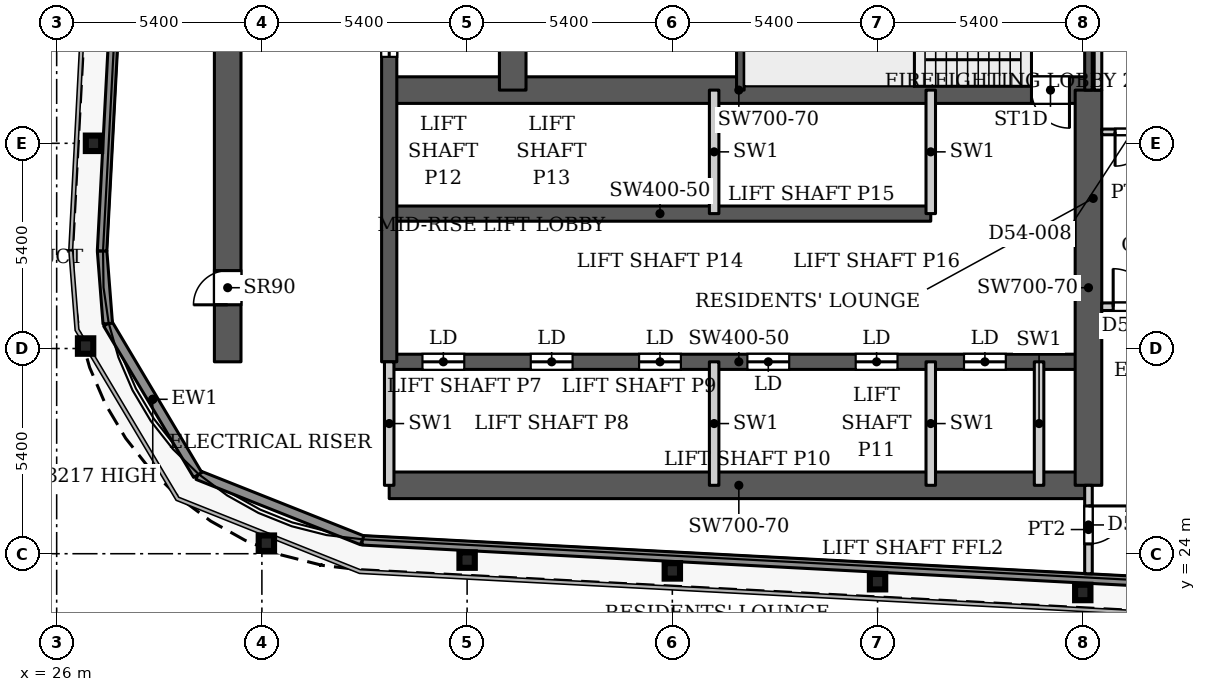
"""IFC4 building model, lengths in metres.
Left out: names, types, materials, properties, quantities, classifications, styles, units other than length and angle.
Written with IfcOpenShell. Run it as: python <this file> out.ifc"""

import sys

from ifc_helpers import new_model, si_unit, direction, frame, frame_2d, origin, origin_2d, place, context, subcontext, project, spatial, rectangle, i_section, extrude, source, transform, mapped, element, fill, save


model = new_model("IFC4")
c1 = context("Model", 3, precision=1e-05, world=origin(), true_north=direction((0.0, 1.0)))
c2 = subcontext(c1, "Body", "Model", "MODEL_VIEW")
j1 = project(units=[si_unit("LENGTHUNIT", "METRE"), si_unit("PLANEANGLEUNIT", "RADIAN")], contexts=[c1])
p1 = place(None, origin())
s1 = spatial("IfcSite", under=j1, at=p1, CompositionType="ELEMENT")
p2 = place(p1, origin())
s2 = spatial("IfcBuilding", under=s1, at=p2, CompositionType="ELEMENT")
p3 = place(p2, frame((0.0, 0.0, 235.7)))
s3 = spatial("IfcBuildingStorey", under=s2, at=p3, CompositionType="ELEMENT", Elevation=235.7)
for number, where, z_axis, x_axis in (
    (1, (53.0, 22.98, 0.0), (0.0, 0.0, 1.0), (1.0, 0.0, 0.0)),
    (2, (47.6, 23.264, 0.0), (0.0, 0.0, 1.0), (1.0, 0.0, 0.0)),
    (3, (42.2, 23.548, 0.0), (0.0, 0.0, 1.0), (1.0, 0.0, 0.0)),
    (4, (36.8, 23.832, 0.0), (0.0, 0.0, 1.0), (1.0, 0.0, 0.0)),
    (5, (31.518, 24.277, 0.0), (0.0, 0.0, 1.0), (1.0, 0.0, 0.0)),
    (6, (26.761, 29.465, 0.0), (0.0, 0.0, 1.0), (1.0, 0.0, 0.0)),
    (7, (26.969, 34.8, 0.0), (0.0, 0.0, 1.0), (1.0, 0.0, 0.0)),
):
    element("IfcColumn", number, at=place(p3, frame(where, z_axis=z_axis, x_axis=x_axis)), inside=s3, PredefinedType="COLUMN", context=c2, shape_type="SweptSolid", body=[
        extrude(i_section(OverallWidth=0.404, OverallDepth=0.407, WebThickness=0.027, FlangeThickness=0.044, FilletRadius=0.012, at=origin_2d()), origin(), (0.0, 0.0, 1.0), 3.9),
    ])
p4 = place(p3, frame((34.75, 25.8, 0.0), z_axis=(0.0, 0.0, 1.0), x_axis=(1.0, 0.0, 0.0)))
e8 = element("IfcWall", 8, at=p4, inside=s3, PredefinedType="SHEAR", context=c2, shape_type="SweptSolid", body=[
    extrude(rectangle(XDim=18.4, YDim=0.7, at=frame_2d((9.2, 0.0))), origin(), (0.0, 0.0, 1.0), 3.9),
])
p5 = place(p3, frame((34.75, 29.05, 0.0), z_axis=(0.0, 0.0, 1.0), x_axis=(1.0, 0.0, 0.0)))
e9 = element("IfcWall", 9, at=p5, inside=s3, PredefinedType="SHEAR", context=c2, shape_type="SweptSolid", body=[
    extrude(rectangle(XDim=18.4, YDim=0.4, at=frame_2d((9.2, 0.0))), origin(), (0.0, 0.0, 1.0), 3.9),
])
p6 = place(p5, frame((0.875, 0.0, 0.0)))
e10 = element("IfcOpeningElement", 10, at=p6, cuts=e9, PredefinedType="OPENING", context=c2, shape_type="SweptSolid", body=[
    extrude(rectangle(XDim=1.1, YDim=2.2, at=frame_2d((0.55, 1.1))), frame((0.0, 0.21, 0.0), z_axis=(0.0, -1.0, 0.0), x_axis=(1.0, 0.0, 0.0)), (0.0, 0.0, 1.0), 0.42),
])
p7 = place(p5, frame((3.725, 0.0, 0.0)))
e11 = element("IfcOpeningElement", 11, at=p7, cuts=e9, PredefinedType="OPENING", context=c2, shape_type="SweptSolid", body=[
    extrude(rectangle(XDim=1.1, YDim=2.2, at=frame_2d((0.55, 1.1))), frame((0.0, 0.21, 0.0), z_axis=(0.0, -1.0, 0.0), x_axis=(1.0, 0.0, 0.0)), (0.0, 0.0, 1.0), 0.42),
])
p8 = place(p5, frame((6.575, 0.0, 0.0)))
e12 = element("IfcOpeningElement", 12, at=p8, cuts=e9, PredefinedType="OPENING", context=c2, shape_type="SweptSolid", body=[
    extrude(rectangle(XDim=1.1, YDim=2.2, at=frame_2d((0.55, 1.1))), frame((0.0, 0.21, 0.0), z_axis=(0.0, -1.0, 0.0), x_axis=(1.0, 0.0, 0.0)), (0.0, 0.0, 1.0), 0.42),
])
p9 = place(p5, frame((9.425, 0.0, 0.0)))
e13 = element("IfcOpeningElement", 13, at=p9, cuts=e9, PredefinedType="OPENING", context=c2, shape_type="SweptSolid", body=[
    extrude(rectangle(XDim=1.1, YDim=2.2, at=frame_2d((0.55, 1.1))), frame((0.0, 0.21, 0.0), z_axis=(0.0, -1.0, 0.0), x_axis=(1.0, 0.0, 0.0)), (0.0, 0.0, 1.0), 0.42),
])
p10 = place(p5, frame((12.275, 0.0, 0.0)))
e14 = element("IfcOpeningElement", 14, at=p10, cuts=e9, PredefinedType="OPENING", context=c2, shape_type="SweptSolid", body=[
    extrude(rectangle(XDim=1.1, YDim=2.2, at=frame_2d((0.55, 1.1))), frame((0.0, 0.21, 0.0), z_axis=(0.0, -1.0, 0.0), x_axis=(1.0, 0.0, 0.0)), (0.0, 0.0, 1.0), 0.42),
])
p11 = place(p5, frame((15.125, 0.0, 0.0)))
e15 = element("IfcOpeningElement", 15, at=p11, cuts=e9, PredefinedType="OPENING", context=c2, shape_type="SweptSolid", body=[
    extrude(rectangle(XDim=1.1, YDim=2.2, at=frame_2d((0.55, 1.1))), frame((0.0, 0.21, 0.0), z_axis=(0.0, -1.0, 0.0), x_axis=(1.0, 0.0, 0.0)), (0.0, 0.0, 1.0), 0.42),
])
p12 = place(p3, frame((34.75, 32.95, 0.0), z_axis=(0.0, 0.0, 1.0), x_axis=(1.0, 0.0, 0.0)))
e16 = element("IfcWall", 16, at=p12, inside=s3, PredefinedType="SHEAR", context=c2, shape_type="SweptSolid", body=[
    extrude(rectangle(XDim=14.25, YDim=0.4, at=frame_2d((7.125, 0.0))), origin(), (0.0, 0.0, 1.0), 3.9),
])
p13 = place(p3, frame((34.75, 36.2, 0.0), z_axis=(0.0, 0.0, 1.0), x_axis=(1.0, 0.0, 0.0)))
e17 = element("IfcWall", 17, at=p13, inside=s3, PredefinedType="SHEAR", context=c2, shape_type="SweptSolid", body=[
    extrude(rectangle(XDim=18.4, YDim=0.7, at=frame_2d((9.2, 0.0))), origin(), (0.0, 0.0, 1.0), 3.9),
])
p14 = place(p13, frame((16.9, 0.0, 0.0)))
e18 = element("IfcOpeningElement", 18, at=p14, cuts=e17, PredefinedType="OPENING", context=c2, shape_type="SweptSolid", body=[
    extrude(rectangle(XDim=1.0, YDim=2.2, at=frame_2d((0.5, 1.1))), frame((0.0, 0.36, 0.0), z_axis=(0.0, -1.0, 0.0), x_axis=(1.0, 0.0, 0.0)), (0.0, 0.0, 1.0), 0.72),
])
p15 = place(p3, frame((34.75, 29.05, 0.0), z_axis=(0.0, 0.0, 1.0), x_axis=(0.0, 1.0, 0.0)))
e19 = element("IfcWall", 19, at=p15, inside=s3, PredefinedType="SHEAR", context=c2, shape_type="SweptSolid", body=[
    extrude(rectangle(XDim=18.45, YDim=0.4, at=frame_2d((9.225, 0.0))), origin(), (0.0, 0.0, 1.0), 3.9),
])
p16 = place(p15, frame((8.025, 0.0, 0.0)))
e20 = element("IfcOpeningElement", 20, at=p16, cuts=e19, PredefinedType="OPENING", context=c2, shape_type="SweptSolid", body=[
    extrude(rectangle(XDim=1.1, YDim=2.2, at=frame_2d((0.55, 1.1))), frame((0.0, 0.21, 0.0), z_axis=(0.0, -1.0, 0.0), x_axis=(1.0, 0.0, 0.0)), (0.0, 0.0, 1.0), 0.42),
])
p17 = place(p15, frame((10.875, 0.0, 0.0)))
e21 = element("IfcOpeningElement", 21, at=p17, cuts=e19, PredefinedType="OPENING", context=c2, shape_type="SweptSolid", body=[
    extrude(rectangle(XDim=1.1, YDim=2.2, at=frame_2d((0.55, 1.1))), frame((0.0, 0.21, 0.0), z_axis=(0.0, -1.0, 0.0), x_axis=(1.0, 0.0, 0.0)), (0.0, 0.0, 1.0), 0.42),
])
p18 = place(p15, frame((13.725, 0.0, 0.0)))
e22 = element("IfcOpeningElement", 22, at=p18, cuts=e19, PredefinedType="OPENING", context=c2, shape_type="SweptSolid", body=[
    extrude(rectangle(XDim=1.1, YDim=2.2, at=frame_2d((0.55, 1.1))), frame((0.0, 0.21, 0.0), z_axis=(0.0, -1.0, 0.0), x_axis=(1.0, 0.0, 0.0)), (0.0, 0.0, 1.0), 0.42),
])
p19 = place(p15, frame((15.95, 0.0, 0.0)))
e23 = element("IfcOpeningElement", 23, at=p19, cuts=e19, PredefinedType="OPENING", context=c2, shape_type="SweptSolid", body=[
    extrude(rectangle(XDim=1.1, YDim=2.2, at=frame_2d((0.55, 1.1))), frame((0.0, 0.21, 0.0), z_axis=(0.0, -1.0, 0.0), x_axis=(1.0, 0.0, 0.0)), (0.0, 0.0, 1.0), 0.42),
])
p20 = place(p3, frame((38.0, 36.2, 0.0), z_axis=(0.0, 0.0, 1.0), x_axis=(0.0, 1.0, 0.0)))
e24 = element("IfcWall", 24, at=p20, inside=s3, PredefinedType="SHEAR", context=c2, shape_type="SweptSolid", body=[
    extrude(rectangle(XDim=8.55, YDim=0.7, at=frame_2d((4.275, 0.0))), origin(), (0.0, 0.0, 1.0), 3.9),
])
p21 = place(p3, frame((30.5, 29.05, 0.0), z_axis=(0.0, 0.0, 1.0), x_axis=(0.0, 1.0, 0.0)))
e25 = element("IfcWall", 25, at=p21, inside=s3, PredefinedType="SHEAR", context=c2, shape_type="SweptSolid", body=[
    extrude(rectangle(XDim=18.45, YDim=0.7, at=frame_2d((9.225, 0.0))), origin(), (0.0, 0.0, 1.0), 3.9),
])
p22 = place(p21, frame((1.5, 0.0, 0.0)))
e26 = element("IfcOpeningElement", 26, at=p22, cuts=e25, PredefinedType="OPENING", context=c2, shape_type="SweptSolid", body=[
    extrude(rectangle(XDim=0.9, YDim=2.2, at=frame_2d((0.45, 1.1))), frame((0.0, 0.36, 0.0), z_axis=(0.0, -1.0, 0.0), x_axis=(1.0, 0.0, 0.0)), (0.0, 0.0, 1.0), 0.72),
])
p23 = place(p21, frame((8.705, 0.0, 0.0)))
e27 = element("IfcOpeningElement", 27, at=p23, cuts=e25, PredefinedType="OPENING", context=c2, shape_type="SweptSolid", body=[
    extrude(rectangle(XDim=0.9, YDim=2.2, at=frame_2d((0.45, 1.1))), frame((0.0, 0.36, 0.0), z_axis=(0.0, -1.0, 0.0), x_axis=(1.0, 0.0, 0.0)), (0.0, 0.0, 1.0), 0.72),
])
p24 = place(p3, frame((53.15, 25.8, 0.0), z_axis=(0.0, 0.0, 1.0), x_axis=(0.0, 1.0, 0.0)))
e28 = element("IfcWall", 28, at=p24, inside=s3, PredefinedType="SHEAR", context=c2, shape_type="SweptSolid", body=[
    extrude(rectangle(XDim=10.4, YDim=0.7, at=frame_2d((5.2, 0.0))), origin(), (0.0, 0.0, 1.0), 3.9),
])
p25 = place(p3, frame((84.386, 21.703, 0.0), z_axis=(0.0, 0.0, 1.0), x_axis=(-0.998617508267, 0.05256493302, 0.0)))
e29 = element("IfcWall", 29, at=p25, inside=s3, PredefinedType="SOLIDWALL", context=c2, shape_type="SweptSolid", body=[
    extrude(rectangle(XDim=50.417, YDim=0.25, at=frame_2d((25.208, 0.0))), origin(), (0.0, 0.0, 1.0), 3.75),
])
p26 = place(p3, frame((34.039, 24.353, 0.0), z_axis=(0.0, 0.0, 1.0), x_axis=(-0.929352825399, 0.369192803184, 0.0)))
e30 = element("IfcWall", 30, at=p26, inside=s3, PredefinedType="SOLIDWALL", context=c2, shape_type="SweptSolid", body=[
    extrude(rectangle(XDim=4.656, YDim=0.25, at=frame_2d((2.328, 0.0))), origin(), (0.0, 0.0, 1.0), 3.75),
])
p27 = place(p3, frame((29.712, 26.072, 0.0), z_axis=(0.0, 0.0, 1.0), x_axis=(-0.511028049012, 0.859564036662, 0.0)))
e31 = element("IfcWall", 31, at=p27, inside=s3, PredefinedType="SOLIDWALL", context=c2, shape_type="SweptSolid", body=[
    extrude(rectangle(XDim=4.634, YDim=0.25, at=frame_2d((2.317, 0.0))), origin(), (0.0, 0.0, 1.0), 3.217),
])
p28 = place(p3, frame((27.344, 30.055, 0.0), z_axis=(0.0, 0.0, 1.0), x_axis=(-0.077571675317, 0.99698677784, 0.0)))
e32 = element("IfcWall", 32, at=p28, inside=s3, PredefinedType="SOLIDWALL", context=c2, shape_type="SweptSolid", body=[
    extrude(rectangle(XDim=1.92, YDim=0.25, at=frame_2d((0.96, 0.0))), origin(), (0.0, 0.0, 1.0), 3.75),
])
p29 = place(p3, frame((27.195, 31.969, 0.0), z_axis=(0.0, 0.0, 1.0), x_axis=(0.052555284099, 0.998618016117, 0.0)))
e33 = element("IfcWall", 33, at=p29, inside=s3, PredefinedType="SOLIDWALL", context=c2, shape_type="SweptSolid", body=[
    extrude(rectangle(XDim=61.38, YDim=0.25, at=frame_2d((30.69, 0.0))), origin(), (0.0, 0.0, 1.0), 3.75),
])
for number, where, z_axis, x_axis in (
    (34, (43.99, 36.2, 0.0), (0.0, 0.0, 1.0), (0.0, 1.0, 0.0)),
    (35, (53.15, 36.2, 0.0), (0.0, 0.0, 1.0), (0.0, 1.0, 0.0)),
):
    element("IfcWall", number, at=place(p3, frame(where, z_axis=z_axis, x_axis=x_axis)), inside=s3, PredefinedType="SHEAR", context=c2, shape_type="SweptSolid", body=[
        extrude(rectangle(XDim=3.15, YDim=0.2, at=frame_2d((1.575, 0.0))), origin(), (0.0, 0.0, 1.0), 3.9),
    ])
for number, where, z_axis, x_axis in (
    (36, (34.75, 25.8, 0.0), (0.0, 0.0, 1.0), (0.0, 1.0, 0.0)),
    (37, (43.3, 25.8, 0.0), (0.0, 0.0, 1.0), (0.0, 1.0, 0.0)),
    (38, (43.3, 32.95, 0.0), (0.0, 0.0, 1.0), (0.0, 1.0, 0.0)),
    (39, (49.0, 25.8, 0.0), (0.0, 0.0, 1.0), (0.0, 1.0, 0.0)),
    (40, (49.0, 32.95, 0.0), (0.0, 0.0, 1.0), (0.0, 1.0, 0.0)),
    (41, (51.85, 25.8, 0.0), (0.0, 0.0, 1.0), (0.0, 1.0, 0.0)),
):
    element("IfcWall", number, at=place(p3, frame(where, z_axis=z_axis, x_axis=x_axis)), inside=s3, PredefinedType="PARTITIONING", context=c2, shape_type="SweptSolid", body=[
        extrude(rectangle(XDim=3.25, YDim=0.25, at=frame_2d((1.625, 0.0))), origin(), (0.0, 0.0, 1.0), 3.9),
    ])
p30 = place(p3, frame((53.15, 23.472, 0.0), z_axis=(0.0, 0.0, 1.0), x_axis=(0.0, 1.0, 0.0)))
e42 = element("IfcWall", 42, at=p30, inside=s3, PredefinedType="PARTITIONING", context=c2, shape_type="SweptSolid", body=[
    extrude(rectangle(XDim=2.328, YDim=0.2, at=frame_2d((1.164, 0.0))), origin(), (0.0, 0.0, 1.0), 3.6),
])
p31 = place(p30, frame((0.785, 0.0, 0.0)))
e43 = element("IfcOpeningElement", 43, at=p31, cuts=e42, PredefinedType="OPENING", context=c2, shape_type="SweptSolid", body=[
    extrude(rectangle(XDim=1.0, YDim=2.1, at=frame_2d((0.5, 1.05))), frame((0.0, 0.11, 0.0), z_axis=(0.0, -1.0, 0.0), x_axis=(1.0, 0.0, 0.0)), (0.0, 0.0, 1.0), 0.22),
])
p32 = place(p3, frame((53.4, 36.199, 0.0), z_axis=(0.0, 0.0, 1.0), x_axis=(0.0, 1.0, 0.0)))
e44 = element("IfcWall", 44, at=p32, inside=s3, PredefinedType="PARTITIONING", context=c2, shape_type="SweptSolid", body=[
    extrude(rectangle(XDim=7.701, YDim=0.2, at=frame_2d((3.851, 0.0))), origin(), (0.0, 0.0, 1.0), 3.6),
])
p33 = place(p3, frame((53.499, 30.5, 0.0), z_axis=(0.0, 0.0, 1.0), x_axis=(1.0, 0.0, 0.0)))
e45 = element("IfcWall", 45, at=p33, inside=s3, PredefinedType="PARTITIONING", context=c2, shape_type="SweptSolid", body=[
    extrude(rectangle(XDim=28.401, YDim=0.2, at=frame_2d((14.2, 0.0))), origin(), (0.0, 0.0, 1.0), 3.6),
])
p34 = place(p33, frame((0.301, 0.0, 0.0)))
e46 = element("IfcOpeningElement", 46, at=p34, cuts=e45, PredefinedType="OPENING", context=c2, shape_type="SweptSolid", body=[
    extrude(rectangle(XDim=1.0, YDim=2.1, at=frame_2d((0.5, 1.05))), frame((0.0, 0.11, 0.0), z_axis=(0.0, -1.0, 0.0), x_axis=(1.0, 0.0, 0.0)), (0.0, 0.0, 1.0), 0.22),
])
p35 = place(p33, frame((18.151, 0.0, 0.0)))
e47 = element("IfcOpeningElement", 47, at=p35, cuts=e45, PredefinedType="OPENING", context=c2, shape_type="SweptSolid", body=[
    extrude(rectangle(XDim=1.0, YDim=2.1, at=frame_2d((0.5, 1.05))), frame((0.0, 0.11, 0.0), z_axis=(0.0, -1.0, 0.0), x_axis=(1.0, 0.0, 0.0)), (0.0, 0.0, 1.0), 0.22),
])
p36 = place(p33, frame((25.801, 0.0, 0.0)))
e48 = element("IfcOpeningElement", 48, at=p36, cuts=e45, PredefinedType="OPENING", context=c2, shape_type="SweptSolid", body=[
    extrude(rectangle(XDim=1.0, YDim=2.1, at=frame_2d((0.5, 1.05))), frame((0.0, 0.11, 0.0), z_axis=(0.0, -1.0, 0.0), x_axis=(1.0, 0.0, 0.0)), (0.0, 0.0, 1.0), 0.22),
])
p37 = place(p3, frame((53.499, 35.1, 0.0), z_axis=(0.0, 0.0, 1.0), x_axis=(1.0, 0.0, 0.0)))
e49 = element("IfcWall", 49, at=p37, inside=s3, PredefinedType="PARTITIONING", context=c2, shape_type="SweptSolid", body=[
    extrude(rectangle(XDim=11.501, YDim=0.15, at=frame_2d((5.75, 0.0))), origin(), (0.0, 0.0, 1.0), 3.6),
])
p38 = place(p37, frame((5.001, 0.0, 0.0)))
e50 = element("IfcOpeningElement", 50, at=p38, cuts=e49, PredefinedType="OPENING", context=c2, shape_type="SweptSolid", body=[
    extrude(rectangle(XDim=0.9, YDim=2.1, at=frame_2d((0.45, 1.05))), frame((0.0, 0.085, 0.0), z_axis=(0.0, -1.0, 0.0), x_axis=(1.0, 0.0, 0.0)), (0.0, 0.0, 1.0), 0.17),
])
p39 = place(p37, frame((8.851, 0.0, 0.0)))
e51 = element("IfcOpeningElement", 51, at=p39, cuts=e49, PredefinedType="OPENING", context=c2, shape_type="SweptSolid", body=[
    extrude(rectangle(XDim=1.0, YDim=2.1, at=frame_2d((0.5, 1.05))), frame((0.0, 0.085, 0.0), z_axis=(0.0, -1.0, 0.0), x_axis=(1.0, 0.0, 0.0)), (0.0, 0.0, 1.0), 0.17),
])
p40 = place(p37, frame((0.351, 0.0, 0.0)))
e52 = element("IfcOpeningElement", 52, at=p40, cuts=e49, PredefinedType="OPENING", context=c2, shape_type="SweptSolid", body=[
    extrude(rectangle(XDim=0.9, YDim=2.1, at=frame_2d((0.45, 1.05))), frame((0.0, 0.085, 0.0), z_axis=(0.0, -1.0, 0.0), x_axis=(1.0, 0.0, 0.0)), (0.0, 0.0, 1.0), 0.17),
])
m1 = source(origin(), c2, "Body", "SweptSolid", [
    extrude(rectangle(XDim=1.1, YDim=2.2, at=frame_2d((0.55, 1.1))), frame((0.0, 0.025, 0.0), z_axis=(0.0, -1.0, 0.0), x_axis=(1.0, 0.0, 0.0)), (0.0, 0.0, 1.0), 0.05),
])
p41 = place(p6, origin())
e53 = element("IfcDoor", 53, at=p41, inside=s3, OperationType="SLIDING_TO_LEFT", PredefinedType="DOOR", context=c2, shape_type="MappedRepresentation", body=[
    mapped(m1, transform((0.0, 0.0, 0.0), x_axis=(1.0, 0.0, 0.0), y_axis=(0.0, 1.0, 0.0), z_axis=(0.0, 0.0, 1.0), scale=1.0)),
])
fill(e10, e53)
p42 = place(p7, origin())
e54 = element("IfcDoor", 54, at=p42, inside=s3, OperationType="SLIDING_TO_LEFT", PredefinedType="DOOR", context=c2, shape_type="MappedRepresentation", body=[
    mapped(m1, transform((0.0, 0.0, 0.0), x_axis=(1.0, 0.0, 0.0), y_axis=(0.0, 1.0, 0.0), z_axis=(0.0, 0.0, 1.0), scale=1.0)),
])
fill(e11, e54)
p43 = place(p8, origin())
e55 = element("IfcDoor", 55, at=p43, inside=s3, OperationType="SLIDING_TO_LEFT", PredefinedType="DOOR", context=c2, shape_type="MappedRepresentation", body=[
    mapped(m1, transform((0.0, 0.0, 0.0), x_axis=(1.0, 0.0, 0.0), y_axis=(0.0, 1.0, 0.0), z_axis=(0.0, 0.0, 1.0), scale=1.0)),
])
fill(e12, e55)
p44 = place(p9, origin())
e56 = element("IfcDoor", 56, at=p44, inside=s3, OperationType="SLIDING_TO_LEFT", PredefinedType="DOOR", context=c2, shape_type="MappedRepresentation", body=[
    mapped(m1, transform((0.0, 0.0, 0.0), x_axis=(1.0, 0.0, 0.0), y_axis=(0.0, 1.0, 0.0), z_axis=(0.0, 0.0, 1.0), scale=1.0)),
])
fill(e13, e56)
p45 = place(p10, origin())
e57 = element("IfcDoor", 57, at=p45, inside=s3, OperationType="SLIDING_TO_LEFT", PredefinedType="DOOR", context=c2, shape_type="MappedRepresentation", body=[
    mapped(m1, transform((0.0, 0.0, 0.0), x_axis=(1.0, 0.0, 0.0), y_axis=(0.0, 1.0, 0.0), z_axis=(0.0, 0.0, 1.0), scale=1.0)),
])
fill(e14, e57)
p46 = place(p16, origin())
e58 = element("IfcDoor", 58, at=p46, inside=s3, OperationType="SLIDING_TO_LEFT", PredefinedType="DOOR", context=c2, shape_type="MappedRepresentation", body=[
    mapped(m1, transform((0.0, 0.0, 0.0), x_axis=(1.0, 0.0, 0.0), y_axis=(0.0, 1.0, 0.0), z_axis=(0.0, 0.0, 1.0), scale=1.0)),
])
fill(e20, e58)
p47 = place(p11, origin())
e59 = element("IfcDoor", 59, at=p47, inside=s3, OperationType="SLIDING_TO_LEFT", PredefinedType="DOOR", context=c2, shape_type="MappedRepresentation", body=[
    mapped(m1, transform((0.0, 0.0, 0.0), x_axis=(1.0, 0.0, 0.0), y_axis=(0.0, 1.0, 0.0), z_axis=(0.0, 0.0, 1.0), scale=1.0)),
])
fill(e15, e59)
m2 = source(origin(), c2, "Body", "SweptSolid", [
    extrude(rectangle(XDim=0.9, YDim=2.2, at=frame_2d((0.45, 1.1))), frame((0.0, 0.025, 0.0), z_axis=(0.0, -1.0, 0.0), x_axis=(1.0, 0.0, 0.0)), (0.0, 0.0, 1.0), 0.05),
])
p48 = place(p22, origin())
e60 = element("IfcDoor", 60, at=p48, inside=s3, OperationType="SINGLE_SWING_LEFT", PredefinedType="DOOR", context=c2, shape_type="MappedRepresentation", body=[
    mapped(m2, transform((0.0, 0.0, 0.0), x_axis=(1.0, 0.0, 0.0), y_axis=(0.0, 1.0, 0.0), z_axis=(0.0, 0.0, 1.0), scale=1.0)),
])
fill(e26, e60)
m3 = source(origin(), c2, "Body", "SweptSolid", [
    extrude(rectangle(XDim=1.0, YDim=2.2, at=frame_2d((0.5, 1.1))), frame((0.0, 0.025, 0.0), z_axis=(0.0, -1.0, 0.0), x_axis=(1.0, 0.0, 0.0)), (0.0, 0.0, 1.0), 0.05),
])
p49 = place(p14, origin())
e61 = element("IfcDoor", 61, at=p49, inside=s3, OperationType="SINGLE_SWING_RIGHT", PredefinedType="DOOR", context=c2, shape_type="MappedRepresentation", body=[
    mapped(m3, transform((0.0, 0.0, 0.0), x_axis=(1.0, 0.0, 0.0), y_axis=(0.0, 1.0, 0.0), z_axis=(0.0, 0.0, 1.0), scale=1.0)),
])
fill(e18, e61)
m4 = source(origin(), c2, "Body", "SweptSolid", [
    extrude(rectangle(XDim=1.0, YDim=2.1, at=frame_2d((0.5, 1.05))), frame((0.0, 0.025, 0.0), z_axis=(0.0, -1.0, 0.0), x_axis=(1.0, 0.0, 0.0)), (0.0, 0.0, 1.0), 0.05),
])
p50 = place(p34, origin())
e62 = element("IfcDoor", 62, at=p50, inside=s3, OperationType="SINGLE_SWING_LEFT", PredefinedType="DOOR", context=c2, shape_type="MappedRepresentation", body=[
    mapped(m4, transform((0.0, 0.0, 0.0), x_axis=(1.0, 0.0, 0.0), y_axis=(0.0, 1.0, 0.0), z_axis=(0.0, 0.0, 1.0), scale=1.0)),
])
fill(e46, e62)
m5 = source(origin(), c2, "Body", "SweptSolid", [
    extrude(rectangle(XDim=0.9, YDim=2.1, at=frame_2d((0.45, 1.05))), frame((0.0, 0.025, 0.0), z_axis=(0.0, -1.0, 0.0), x_axis=(1.0, 0.0, 0.0)), (0.0, 0.0, 1.0), 0.05),
])
p51 = place(p40, origin())
e63 = element("IfcDoor", 63, at=p51, inside=s3, OperationType="SINGLE_SWING_RIGHT", PredefinedType="DOOR", context=c2, shape_type="MappedRepresentation", body=[
    mapped(m5, transform((0.0, 0.0, 0.0), x_axis=(1.0, 0.0, 0.0), y_axis=(0.0, 1.0, 0.0), z_axis=(0.0, 0.0, 1.0), scale=1.0)),
])
fill(e52, e63)
m6 = source(origin(), c2, "Body", "SweptSolid", [
    extrude(rectangle(XDim=1.0, YDim=2.1, at=frame_2d((0.5, 1.05))), frame((0.0, 0.025, 0.0), z_axis=(0.0, -1.0, 0.0), x_axis=(1.0, 0.0, 0.0)), (0.0, 0.0, 1.0), 0.05),
])
p52 = place(p31, origin())
e64 = element("IfcDoor", 64, at=p52, inside=s3, OperationType="SINGLE_SWING_RIGHT", PredefinedType="DOOR", context=c2, shape_type="MappedRepresentation", body=[
    mapped(m6, transform((0.0, 0.0, 0.0), x_axis=(1.0, 0.0, 0.0), y_axis=(0.0, 1.0, 0.0), z_axis=(0.0, 0.0, 1.0), scale=1.0)),
])
fill(e43, e64)
save(model, sys.argv[1])
